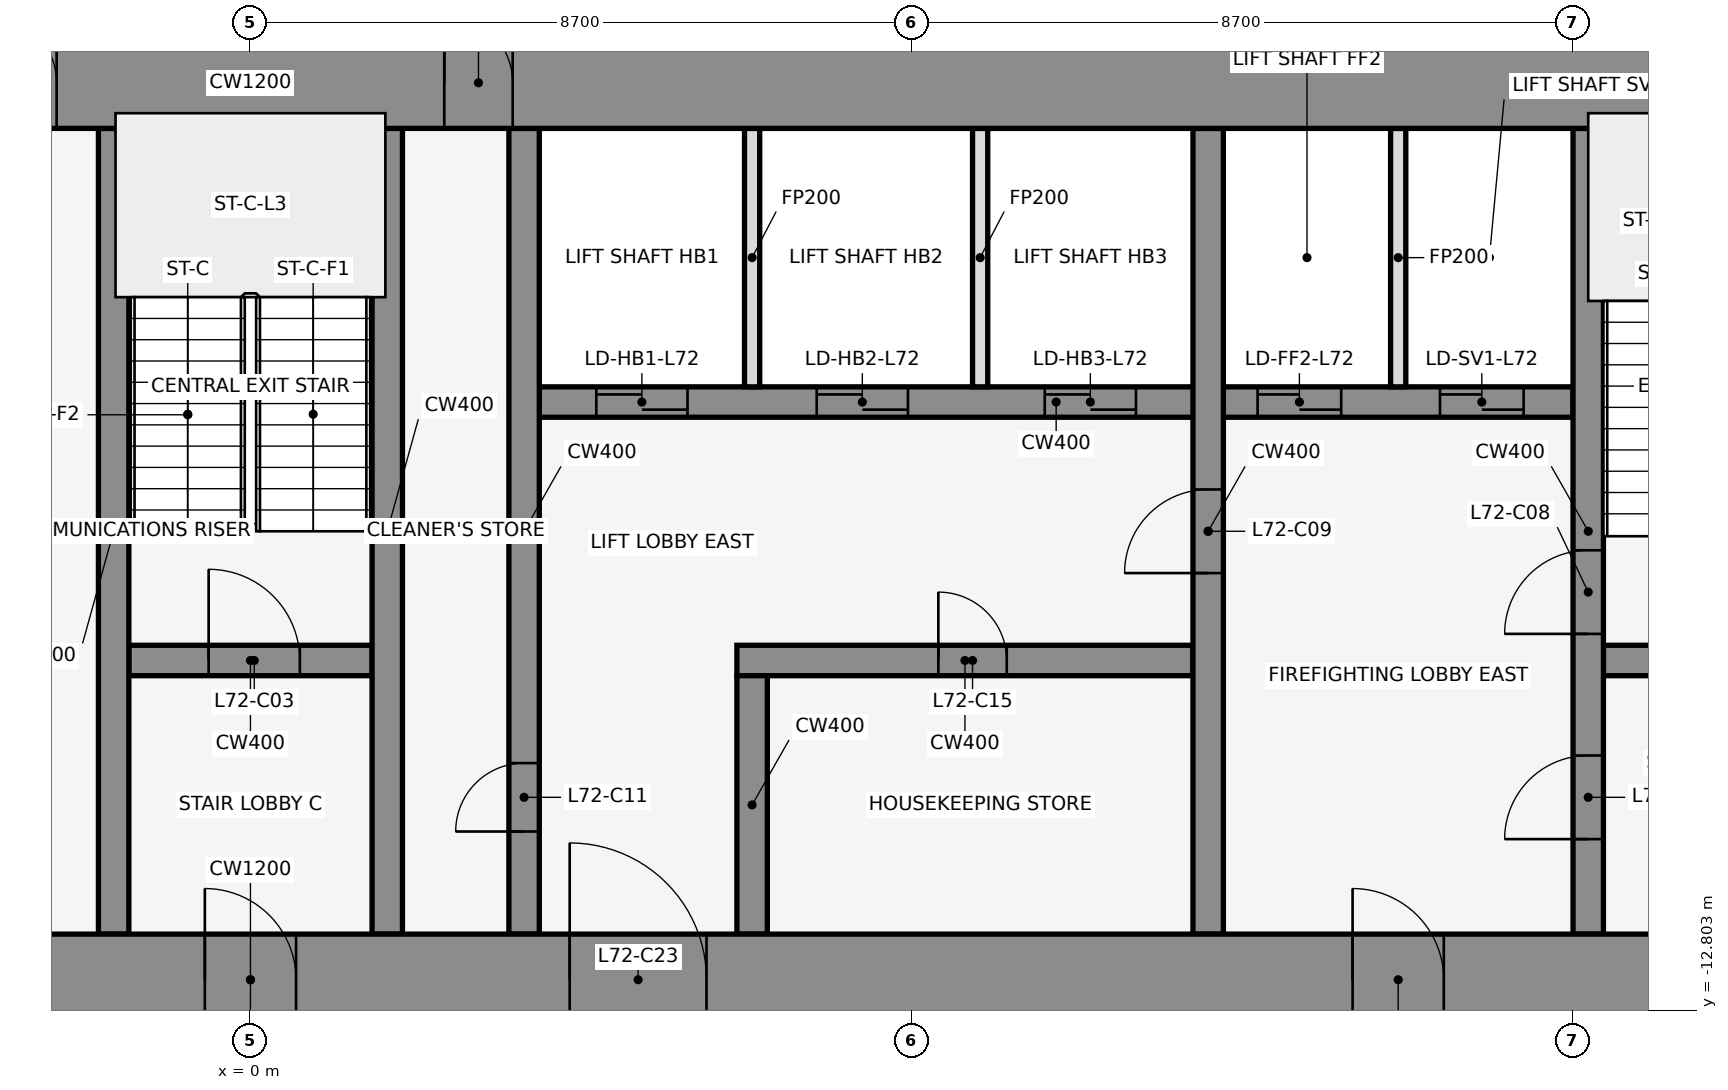
"""IFC4 building model, lengths in metres.
Left out: names, types, materials, properties, quantities, classifications, styles, units other than length and angle.
Written with IfcOpenShell. Run it as: python <this file> out.ifc"""

import sys

from ifc_helpers import new_model, si_unit, direction, frame, frame_2d, origin, place, context, subcontext, project, spatial, rectangle, extrude, element, fill, save


model = new_model("IFC4")
c1 = context("Model", 3, precision=1e-05, world=origin(), true_north=direction((0.0, 1.0)))
c2 = subcontext(c1, "Body", "Model", "MODEL_VIEW")
j1 = project(units=[si_unit("LENGTHUNIT", "METRE"), si_unit("PLANEANGLEUNIT", "RADIAN")], contexts=[c1])
p1 = place(None, origin())
s1 = spatial("IfcSite", under=j1, at=p1, CompositionType="ELEMENT")
p2 = place(p1, origin())
s2 = spatial("IfcBuilding", under=s1, at=p2, CompositionType="ELEMENT")
p3 = place(p2, frame((0.0, 0.0, 320.0)))
s3 = spatial("IfcBuildingStorey", under=s2, at=p3, CompositionType="ELEMENT", Elevation=320.0)
for number, where, z_axis, x_axis in (
    (1, (16.432, -0.105, 0.0), (0.0, 0.0, 1.0), (-0.84, 0.543, 0.0)),
    (2, (1.901, 1.08, 0.0), (0.0, 0.0, 1.0), (-0.84, -0.543, 0.0)),
    (3, (-0.068, -0.105, 0.0), (0.0, 0.0, 1.0), (-0.84, 0.543, 0.0)),
):
    element("IfcWall", number, at=place(p3, frame(where, z_axis=z_axis, x_axis=x_axis)), inside=s3, PredefinedType="STANDARD", context=c2, shape_type="SweptSolid", body=[
        extrude(rectangle(XDim=2.183, YDim=0.25, at=frame_2d((1.091, 0.0))), origin(), (0.0, 0.0, 1.0), 4.35),
    ])
p4 = place(p3, frame((-1.6, -8.2, 0.0), z_axis=(0.0, 0.0, 1.0), x_axis=(1.0, 0.0, 0.0)))
e4 = element("IfcWall", 4, at=p4, inside=s3, PredefinedType="SHEAR", context=c2, shape_type="SweptSolid", body=[
    extrude(rectangle(XDim=3.2, YDim=0.4, at=frame_2d((1.6, 0.0))), origin(), (0.0, 0.0, 1.0), 4.5),
])
p5 = place(p4, frame((1.05, 0.0, 0.0)))
e5 = element("IfcOpeningElement", 5, at=p5, cuts=e4, PredefinedType="OPENING", context=c2, shape_type="SweptSolid", body=[
    extrude(rectangle(XDim=1.2, YDim=2.1, at=frame_2d((0.6, 1.05))), frame((0.0, 0.212, 0.0), z_axis=(0.0, -1.0, 0.0), x_axis=(1.0, 0.0, 0.0)), (0.0, 0.0, 1.0), 0.424),
])
p6 = place(p3, frame((6.4, -8.2, 0.0), z_axis=(0.0, 0.0, 1.0), x_axis=(1.0, 0.0, 0.0)))
e6 = element("IfcWall", 6, at=p6, inside=s3, PredefinedType="SHEAR", context=c2, shape_type="SweptSolid", body=[
    extrude(rectangle(XDim=6.0, YDim=0.4, at=frame_2d((3.0, 0.0))), origin(), (0.0, 0.0, 1.0), 4.5),
])
p7 = place(p6, frame((2.65, 0.0, 0.0)))
e7 = element("IfcOpeningElement", 7, at=p7, cuts=e6, PredefinedType="OPENING", context=c2, shape_type="SweptSolid", body=[
    extrude(rectangle(XDim=0.9, YDim=2.1, at=frame_2d((0.45, 1.05))), frame((0.0, 0.212, 0.0), z_axis=(0.0, -1.0, 0.0), x_axis=(1.0, 0.0, 0.0)), (0.0, 0.0, 1.0), 0.424),
])
p8 = place(p3, frame((17.8, -8.2, 0.0), z_axis=(0.0, 0.0, 1.0), x_axis=(1.0, 0.0, 0.0)))
e8 = element("IfcWall", 8, at=p8, inside=s3, PredefinedType="SHEAR", context=c2, shape_type="SweptSolid", body=[
    extrude(rectangle(XDim=3.0, YDim=0.4, at=frame_2d((1.5, 0.0))), origin(), (0.0, 0.0, 1.0), 4.5),
])
p9 = place(p8, frame((0.85, 0.0, 0.0)))
e9 = element("IfcOpeningElement", 9, at=p9, cuts=e8, PredefinedType="OPENING", context=c2, shape_type="SweptSolid", body=[
    extrude(rectangle(XDim=1.2, YDim=2.1, at=frame_2d((0.6, 1.05))), frame((0.0, 0.212, 0.0), z_axis=(0.0, -1.0, 0.0), x_axis=(1.0, 0.0, 0.0)), (0.0, 0.0, 1.0), 0.424),
])
p10 = place(p3, frame((3.8, -4.8, 0.0), z_axis=(0.0, 0.0, 1.0), x_axis=(1.0, 0.0, 0.0)))
e10 = element("IfcWall", 10, at=p10, inside=s3, PredefinedType="SHEAR", context=c2, shape_type="SweptSolid", body=[
    extrude(rectangle(XDim=13.6, YDim=0.4, at=frame_2d((6.8, 0.0))), origin(), (0.0, 0.0, 1.0), 4.5),
])
p11 = place(p10, frame((0.75, 0.0, 0.0)))
e11 = element("IfcOpeningElement", 11, at=p11, cuts=e10, PredefinedType="OPENING", context=c2, shape_type="SweptSolid", body=[
    extrude(rectangle(XDim=1.2, YDim=2.1, at=frame_2d((0.6, 1.05))), frame((0.0, 0.212, 0.0), z_axis=(0.0, -1.0, 0.0), x_axis=(1.0, 0.0, 0.0)), (0.0, 0.0, 1.0), 0.424),
])
p12 = place(p10, frame((3.65, 0.0, 0.0)))
e12 = element("IfcOpeningElement", 12, at=p12, cuts=e10, PredefinedType="OPENING", context=c2, shape_type="SweptSolid", body=[
    extrude(rectangle(XDim=1.2, YDim=2.1, at=frame_2d((0.6, 1.05))), frame((0.0, 0.212, 0.0), z_axis=(0.0, -1.0, 0.0), x_axis=(1.0, 0.0, 0.0)), (0.0, 0.0, 1.0), 0.424),
])
p13 = place(p10, frame((6.65, 0.0, 0.0)))
e13 = element("IfcOpeningElement", 13, at=p13, cuts=e10, PredefinedType="OPENING", context=c2, shape_type="SweptSolid", body=[
    extrude(rectangle(XDim=1.2, YDim=2.1, at=frame_2d((0.6, 1.05))), frame((0.0, 0.212, 0.0), z_axis=(0.0, -1.0, 0.0), x_axis=(1.0, 0.0, 0.0)), (0.0, 0.0, 1.0), 0.424),
])
p14 = place(p10, frame((9.45, 0.0, 0.0)))
e14 = element("IfcOpeningElement", 14, at=p14, cuts=e10, PredefinedType="OPENING", context=c2, shape_type="SweptSolid", body=[
    extrude(rectangle(XDim=1.1, YDim=2.1, at=frame_2d((0.55, 1.05))), frame((0.0, 0.212, 0.0), z_axis=(0.0, -1.0, 0.0), x_axis=(1.0, 0.0, 0.0)), (0.0, 0.0, 1.0), 0.424),
])
p15 = place(p10, frame((11.85, 0.0, 0.0)))
e15 = element("IfcOpeningElement", 15, at=p15, cuts=e10, PredefinedType="OPENING", context=c2, shape_type="SweptSolid", body=[
    extrude(rectangle(XDim=1.1, YDim=2.1, at=frame_2d((0.55, 1.05))), frame((0.0, 0.212, 0.0), z_axis=(0.0, -1.0, 0.0), x_axis=(1.0, 0.0, 0.0)), (0.0, 0.0, 1.0), 0.424),
])
for number, where, z_axis, x_axis in (
    (16, (-1.8, -11.8, 0.0), (0.0, 0.0, 1.0), (0.0, 1.0, 0.0)),
    (17, (1.8, -11.8, 0.0), (0.0, 0.0, 1.0), (0.0, 1.0, 0.0)),
):
    element("IfcWall", number, at=place(p3, frame(where, z_axis=z_axis, x_axis=x_axis)), inside=s3, PredefinedType="SHEAR", context=c2, shape_type="SweptSolid", body=[
        extrude(rectangle(XDim=10.6, YDim=0.4, at=frame_2d((5.3, 0.0))), origin(), (0.0, 0.0, 1.0), 4.5),
    ])
p16 = place(p3, frame((3.6, -11.8, 0.0), z_axis=(0.0, 0.0, 1.0), x_axis=(0.0, 1.0, 0.0)))
e18 = element("IfcWall", 18, at=p16, inside=s3, PredefinedType="SHEAR", context=c2, shape_type="SweptSolid", body=[
    extrude(rectangle(XDim=10.6, YDim=0.4, at=frame_2d((5.3, 0.0))), origin(), (0.0, 0.0, 1.0), 4.5),
])
p17 = place(p16, frame((1.35, 0.0, 0.0)))
e19 = element("IfcOpeningElement", 19, at=p17, cuts=e18, PredefinedType="OPENING", context=c2, shape_type="SweptSolid", body=[
    extrude(rectangle(XDim=0.9, YDim=2.1, at=frame_2d((0.45, 1.05))), frame((0.0, 0.212, 0.0), z_axis=(0.0, -1.0, 0.0), x_axis=(1.0, 0.0, 0.0)), (0.0, 0.0, 1.0), 0.424),
])
p18 = place(p3, frame((6.6, -11.8, 0.0), z_axis=(0.0, 0.0, 1.0), x_axis=(0.0, 1.0, 0.0)))
e20 = element("IfcWall", 20, at=p18, inside=s3, PredefinedType="SHEAR", context=c2, shape_type="SweptSolid", body=[
    extrude(rectangle(XDim=3.4, YDim=0.4, at=frame_2d((1.7, 0.0))), origin(), (0.0, 0.0, 1.0), 4.5),
])
for number, where, z_axis, x_axis in (
    (21, (6.6, -4.6, 0.0), (0.0, 0.0, 1.0), (0.0, 1.0, 0.0)),
    (22, (9.6, -4.6, 0.0), (0.0, 0.0, 1.0), (0.0, 1.0, 0.0)),
):
    element("IfcWall", number, at=place(p3, frame(where, z_axis=z_axis, x_axis=x_axis)), inside=s3, PredefinedType="PARTITIONING", context=c2, shape_type="SweptSolid", body=[
        extrude(rectangle(XDim=3.4, YDim=0.2, at=frame_2d((1.7, 0.0))), origin(), (0.0, 0.0, 1.0), 3.418),
    ])
p19 = place(p3, frame((12.6, -11.8, 0.0), z_axis=(0.0, 0.0, 1.0), x_axis=(0.0, 1.0, 0.0)))
e23 = element("IfcWall", 23, at=p19, inside=s3, PredefinedType="SHEAR", context=c2, shape_type="SweptSolid", body=[
    extrude(rectangle(XDim=10.6, YDim=0.4, at=frame_2d((5.3, 0.0))), origin(), (0.0, 0.0, 1.0), 4.5),
])
p20 = place(p19, frame((4.75, 0.0, 0.0)))
e24 = element("IfcOpeningElement", 24, at=p20, cuts=e23, PredefinedType="OPENING", context=c2, shape_type="SweptSolid", body=[
    extrude(rectangle(XDim=1.1, YDim=2.1, at=frame_2d((0.55, 1.05))), frame((0.0, 0.212, 0.0), z_axis=(0.0, -1.0, 0.0), x_axis=(1.0, 0.0, 0.0)), (0.0, 0.0, 1.0), 0.424),
])
p21 = place(p3, frame((15.1, -4.6, 0.0), z_axis=(0.0, 0.0, 1.0), x_axis=(0.0, 1.0, 0.0)))
e25 = element("IfcWall", 25, at=p21, inside=s3, PredefinedType="PARTITIONING", context=c2, shape_type="SweptSolid", body=[
    extrude(rectangle(XDim=3.4, YDim=0.2, at=frame_2d((1.7, 0.0))), origin(), (0.0, 0.0, 1.0), 3.418),
])
p22 = place(p3, frame((17.6, -11.8, 0.0), z_axis=(0.0, 0.0, 1.0), x_axis=(0.0, 1.0, 0.0)))
e26 = element("IfcWall", 26, at=p22, inside=s3, PredefinedType="SHEAR", context=c2, shape_type="SweptSolid", body=[
    extrude(rectangle(XDim=10.6, YDim=0.4, at=frame_2d((5.3, 0.0))), origin(), (0.0, 0.0, 1.0), 4.5),
])
p23 = place(p22, frame((1.25, 0.0, 0.0)))
e27 = element("IfcOpeningElement", 27, at=p23, cuts=e26, PredefinedType="OPENING", context=c2, shape_type="SweptSolid", body=[
    extrude(rectangle(XDim=1.1, YDim=2.1, at=frame_2d((0.55, 1.05))), frame((0.0, 0.212, 0.0), z_axis=(0.0, -1.0, 0.0), x_axis=(1.0, 0.0, 0.0)), (0.0, 0.0, 1.0), 0.424),
])
p24 = place(p22, frame((3.95, 0.0, 0.0)))
e28 = element("IfcOpeningElement", 28, at=p24, cuts=e26, PredefinedType="OPENING", context=c2, shape_type="SweptSolid", body=[
    extrude(rectangle(XDim=1.1, YDim=2.1, at=frame_2d((0.55, 1.05))), frame((0.0, 0.212, 0.0), z_axis=(0.0, -1.0, 0.0), x_axis=(1.0, 0.0, 0.0)), (0.0, 0.0, 1.0), 0.424),
])
p25 = place(p3, frame((-22.0, -0.6, 0.0), z_axis=(0.0, 0.0, 1.0), x_axis=(1.0, 0.0, 0.0)))
e29 = element("IfcWall", 29, at=p25, inside=s3, PredefinedType="SHEAR", context=c2, shape_type="SweptSolid", body=[
    extrude(rectangle(XDim=44.0, YDim=1.2, at=frame_2d((22.0, 0.0))), origin(), (0.0, 0.0, 1.0), 4.5),
])
p26 = place(p25, frame((18.55, 0.0, 0.0)))
e30 = element("IfcOpeningElement", 30, at=p26, cuts=e29, PredefinedType="OPENING", context=c2, shape_type="SweptSolid", body=[
    extrude(rectangle(XDim=0.9, YDim=2.1, at=frame_2d((0.45, 1.05))), frame((0.0, 0.612, 0.0), z_axis=(0.0, -1.0, 0.0), x_axis=(1.0, 0.0, 0.0)), (0.0, 0.0, 1.0), 1.224),
])
p27 = place(p25, frame((24.55, 0.0, 0.0)))
e31 = element("IfcOpeningElement", 31, at=p27, cuts=e29, PredefinedType="OPENING", context=c2, shape_type="SweptSolid", body=[
    extrude(rectangle(XDim=0.9, YDim=2.1, at=frame_2d((0.45, 1.05))), frame((0.0, 0.612, 0.0), z_axis=(0.0, -1.0, 0.0), x_axis=(1.0, 0.0, 0.0)), (0.0, 0.0, 1.0), 1.224),
])
p28 = place(p3, frame((-22.0, -12.4, 0.0), z_axis=(0.0, 0.0, 1.0), x_axis=(1.0, 0.0, 0.0)))
e32 = element("IfcWall", 32, at=p28, inside=s3, PredefinedType="SHEAR", context=c2, shape_type="SweptSolid", body=[
    extrude(rectangle(XDim=44.0, YDim=1.2, at=frame_2d((22.0, 0.0))), origin(), (0.0, 0.0, 1.0), 4.5),
])
p29 = place(p28, frame((2.2, 0.0, 0.0)))
e33 = element("IfcOpeningElement", 33, at=p29, cuts=e32, PredefinedType="OPENING", context=c2, shape_type="SweptSolid", body=[
    extrude(rectangle(XDim=1.2, YDim=2.1, at=frame_2d((0.6, 1.05))), frame((0.0, 0.612, 0.0), z_axis=(0.0, -1.0, 0.0), x_axis=(1.0, 0.0, 0.0)), (0.0, 0.0, 1.0), 1.224),
])
p30 = place(p28, frame((21.4, 0.0, 0.0)))
e34 = element("IfcOpeningElement", 34, at=p30, cuts=e32, PredefinedType="OPENING", context=c2, shape_type="SweptSolid", body=[
    extrude(rectangle(XDim=1.2, YDim=2.1, at=frame_2d((0.6, 1.05))), frame((0.0, 0.612, 0.0), z_axis=(0.0, -1.0, 0.0), x_axis=(1.0, 0.0, 0.0)), (0.0, 0.0, 1.0), 1.224),
])
p31 = place(p28, frame((40.6, 0.0, 0.0)))
e35 = element("IfcOpeningElement", 35, at=p31, cuts=e32, PredefinedType="OPENING", context=c2, shape_type="SweptSolid", body=[
    extrude(rectangle(XDim=1.2, YDim=2.1, at=frame_2d((0.6, 1.05))), frame((0.0, 0.612, 0.0), z_axis=(0.0, -1.0, 0.0), x_axis=(1.0, 0.0, 0.0)), (0.0, 0.0, 1.0), 1.224),
])
p32 = place(p28, frame((16.0, 0.0, 0.0)))
e36 = element("IfcOpeningElement", 36, at=p32, cuts=e32, PredefinedType="OPENING", context=c2, shape_type="SweptSolid", body=[
    extrude(rectangle(XDim=1.8, YDim=2.1, at=frame_2d((0.9, 1.05))), frame((0.0, 0.612, 0.0), z_axis=(0.0, -1.0, 0.0), x_axis=(1.0, 0.0, 0.0)), (0.0, 0.0, 1.0), 1.224),
])
p33 = place(p28, frame((6.3, 0.0, 0.0)))
e37 = element("IfcOpeningElement", 37, at=p33, cuts=e32, PredefinedType="OPENING", context=c2, shape_type="SweptSolid", body=[
    extrude(rectangle(XDim=1.2, YDim=2.1, at=frame_2d((0.6, 1.05))), frame((0.0, 0.612, 0.0), z_axis=(0.0, -1.0, 0.0), x_axis=(1.0, 0.0, 0.0)), (0.0, 0.0, 1.0), 1.224),
])
p34 = place(p28, frame((26.2, 0.0, 0.0)))
e38 = element("IfcOpeningElement", 38, at=p34, cuts=e32, PredefinedType="OPENING", context=c2, shape_type="SweptSolid", body=[
    extrude(rectangle(XDim=1.8, YDim=2.1, at=frame_2d((0.9, 1.05))), frame((0.0, 0.612, 0.0), z_axis=(0.0, -1.0, 0.0), x_axis=(1.0, 0.0, 0.0)), (0.0, 0.0, 1.0), 1.224),
])
p35 = place(p28, frame((36.5, 0.0, 0.0)))
e39 = element("IfcOpeningElement", 39, at=p35, cuts=e32, PredefinedType="OPENING", context=c2, shape_type="SweptSolid", body=[
    extrude(rectangle(XDim=1.2, YDim=2.1, at=frame_2d((0.6, 1.05))), frame((0.0, 0.612, 0.0), z_axis=(0.0, -1.0, 0.0), x_axis=(1.0, 0.0, 0.0)), (0.0, 0.0, 1.0), 1.224),
])
p36 = place(p5, origin())
e40 = element("IfcDoor", 40, at=p36, inside=s3, OperationType="SINGLE_SWING_LEFT", PredefinedType="DOOR", context=c2, shape_type="SweptSolid", body=[
    extrude(rectangle(XDim=1.2, YDim=2.1, at=frame_2d((0.6, 1.05))), frame((0.0, 0.025, 0.0), z_axis=(0.0, -1.0, 0.0), x_axis=(1.0, 0.0, 0.0)), (0.0, 0.0, 1.0), 0.05),
])
fill(e5, e40)
p37 = place(p23, origin())
e41 = element("IfcDoor", 41, at=p37, inside=s3, OperationType="SINGLE_SWING_LEFT", PredefinedType="DOOR", context=c2, shape_type="SweptSolid", body=[
    extrude(rectangle(XDim=1.1, YDim=2.1, at=frame_2d((0.55, 1.05))), frame((0.0, 0.025, 0.0), z_axis=(0.0, -1.0, 0.0), x_axis=(1.0, 0.0, 0.0)), (0.0, 0.0, 1.0), 0.05),
])
fill(e27, e41)
p38 = place(p11, origin())
e42 = element("IfcDoor", 42, at=p38, inside=s3, OperationType="DOUBLE_DOOR_SLIDING", PredefinedType="DOOR", context=c2, shape_type="SweptSolid", body=[
    extrude(rectangle(XDim=1.2, YDim=2.1, at=frame_2d((0.6, 1.05))), frame((0.0, 0.025, 0.0), z_axis=(0.0, -1.0, 0.0), x_axis=(1.0, 0.0, 0.0)), (0.0, 0.0, 1.0), 0.05),
])
fill(e11, e42)
p39 = place(p12, origin())
e43 = element("IfcDoor", 43, at=p39, inside=s3, OperationType="DOUBLE_DOOR_SLIDING", PredefinedType="DOOR", context=c2, shape_type="SweptSolid", body=[
    extrude(rectangle(XDim=1.2, YDim=2.1, at=frame_2d((0.6, 1.05))), frame((0.0, 0.025, 0.0), z_axis=(0.0, -1.0, 0.0), x_axis=(1.0, 0.0, 0.0)), (0.0, 0.0, 1.0), 0.05),
])
fill(e12, e43)
p40 = place(p13, origin())
e44 = element("IfcDoor", 44, at=p40, inside=s3, OperationType="DOUBLE_DOOR_SLIDING", PredefinedType="DOOR", context=c2, shape_type="SweptSolid", body=[
    extrude(rectangle(XDim=1.2, YDim=2.1, at=frame_2d((0.6, 1.05))), frame((0.0, 0.025, 0.0), z_axis=(0.0, -1.0, 0.0), x_axis=(1.0, 0.0, 0.0)), (0.0, 0.0, 1.0), 0.05),
])
fill(e13, e44)
p41 = place(p14, origin())
e45 = element("IfcDoor", 45, at=p41, inside=s3, OperationType="DOUBLE_DOOR_SLIDING", PredefinedType="DOOR", context=c2, shape_type="SweptSolid", body=[
    extrude(rectangle(XDim=1.1, YDim=2.1, at=frame_2d((0.55, 1.05))), frame((0.0, 0.025, 0.0), z_axis=(0.0, -1.0, 0.0), x_axis=(1.0, 0.0, 0.0)), (0.0, 0.0, 1.0), 0.05),
])
fill(e14, e45)
p42 = place(p15, origin())
e46 = element("IfcDoor", 46, at=p42, inside=s3, OperationType="DOUBLE_DOOR_SLIDING", PredefinedType="DOOR", context=c2, shape_type="SweptSolid", body=[
    extrude(rectangle(XDim=1.1, YDim=2.1, at=frame_2d((0.55, 1.05))), frame((0.0, 0.025, 0.0), z_axis=(0.0, -1.0, 0.0), x_axis=(1.0, 0.0, 0.0)), (0.0, 0.0, 1.0), 0.05),
])
fill(e15, e46)
p43 = place(p24, origin())
e47 = element("IfcDoor", 47, at=p43, inside=s3, OperationType="SINGLE_SWING_RIGHT", PredefinedType="DOOR", context=c2, shape_type="SweptSolid", body=[
    extrude(rectangle(XDim=1.1, YDim=2.1, at=frame_2d((0.55, 1.05))), frame((0.0, 0.025, 0.0), z_axis=(0.0, -1.0, 0.0), x_axis=(1.0, 0.0, 0.0)), (0.0, 0.0, 1.0), 0.05),
])
fill(e28, e47)
p44 = place(p20, frame((1.1, 0.0, 0.0), z_axis=(0.0, 0.0, 1.0), x_axis=(-1.0, 0.0, 0.0)))
e48 = element("IfcDoor", 48, at=p44, inside=s3, OperationType="SINGLE_SWING_RIGHT", PredefinedType="DOOR", context=c2, shape_type="SweptSolid", body=[
    extrude(rectangle(XDim=1.1, YDim=2.1, at=frame_2d((0.55, 1.05))), frame((0.0, 0.025, 0.0), z_axis=(0.0, -1.0, 0.0), x_axis=(1.0, 0.0, 0.0)), (0.0, 0.0, 1.0), 0.05),
])
fill(e24, e48)
p45 = place(p17, origin())
e49 = element("IfcDoor", 49, at=p45, inside=s3, OperationType="SINGLE_SWING_LEFT", PredefinedType="DOOR", context=c2, shape_type="SweptSolid", body=[
    extrude(rectangle(XDim=0.9, YDim=2.1, at=frame_2d((0.45, 1.05))), frame((0.0, 0.025, 0.0), z_axis=(0.0, -1.0, 0.0), x_axis=(1.0, 0.0, 0.0)), (0.0, 0.0, 1.0), 0.05),
])
fill(e19, e49)
p46 = place(p7, frame((0.9, 0.0, 0.0), z_axis=(0.0, 0.0, 1.0), x_axis=(-1.0, 0.0, 0.0)))
e50 = element("IfcDoor", 50, at=p46, inside=s3, OperationType="SINGLE_SWING_RIGHT", PredefinedType="DOOR", context=c2, shape_type="SweptSolid", body=[
    extrude(rectangle(XDim=0.9, YDim=2.1, at=frame_2d((0.45, 1.05))), frame((0.0, 0.025, 0.0), z_axis=(0.0, -1.0, 0.0), x_axis=(1.0, 0.0, 0.0)), (0.0, 0.0, 1.0), 0.05),
])
fill(e7, e50)
p47 = place(p26, origin())
e51 = element("IfcDoor", 51, at=p47, inside=s3, OperationType="SINGLE_SWING_LEFT", PredefinedType="DOOR", context=c2, shape_type="SweptSolid", body=[
    extrude(rectangle(XDim=0.9, YDim=2.1, at=frame_2d((0.45, 1.05))), frame((0.0, 0.025, 0.0), z_axis=(0.0, -1.0, 0.0), x_axis=(1.0, 0.0, 0.0)), (0.0, 0.0, 1.0), 0.05),
])
fill(e30, e51)
p48 = place(p27, origin())
e52 = element("IfcDoor", 52, at=p48, inside=s3, OperationType="SINGLE_SWING_LEFT", PredefinedType="DOOR", context=c2, shape_type="SweptSolid", body=[
    extrude(rectangle(XDim=0.9, YDim=2.1, at=frame_2d((0.45, 1.05))), frame((0.0, 0.025, 0.0), z_axis=(0.0, -1.0, 0.0), x_axis=(1.0, 0.0, 0.0)), (0.0, 0.0, 1.0), 0.05),
])
fill(e31, e52)
p49 = place(p30, frame((1.2, 0.0, 0.0), z_axis=(0.0, 0.0, 1.0), x_axis=(-1.0, 0.0, 0.0)))
e53 = element("IfcDoor", 53, at=p49, inside=s3, OperationType="SINGLE_SWING_RIGHT", PredefinedType="DOOR", context=c2, shape_type="SweptSolid", body=[
    extrude(rectangle(XDim=1.2, YDim=2.1, at=frame_2d((0.6, 1.05))), frame((0.0, 0.025, 0.0), z_axis=(0.0, -1.0, 0.0), x_axis=(1.0, 0.0, 0.0)), (0.0, 0.0, 1.0), 0.05),
])
fill(e34, e53)
p50 = place(p34, origin())
e54 = element("IfcDoor", 54, at=p50, inside=s3, OperationType="SINGLE_SWING_LEFT", PredefinedType="DOOR", context=c2, shape_type="SweptSolid", body=[
    extrude(rectangle(XDim=1.8, YDim=2.1, at=frame_2d((0.9, 1.05))), frame((0.0, 0.025, 0.0), z_axis=(0.0, -1.0, 0.0), x_axis=(1.0, 0.0, 0.0)), (0.0, 0.0, 1.0), 0.05),
])
fill(e38, e54)
p51 = place(p35, frame((1.2, 0.0, 0.0), z_axis=(0.0, 0.0, 1.0), x_axis=(-1.0, 0.0, 0.0)))
e55 = element("IfcDoor", 55, at=p51, inside=s3, OperationType="SINGLE_SWING_RIGHT", PredefinedType="DOOR", context=c2, shape_type="SweptSolid", body=[
    extrude(rectangle(XDim=1.2, YDim=2.1, at=frame_2d((0.6, 1.05))), frame((0.0, 0.025, 0.0), z_axis=(0.0, -1.0, 0.0), x_axis=(1.0, 0.0, 0.0)), (0.0, 0.0, 1.0), 0.05),
])
fill(e39, e55)
save(model, sys.argv[1])
